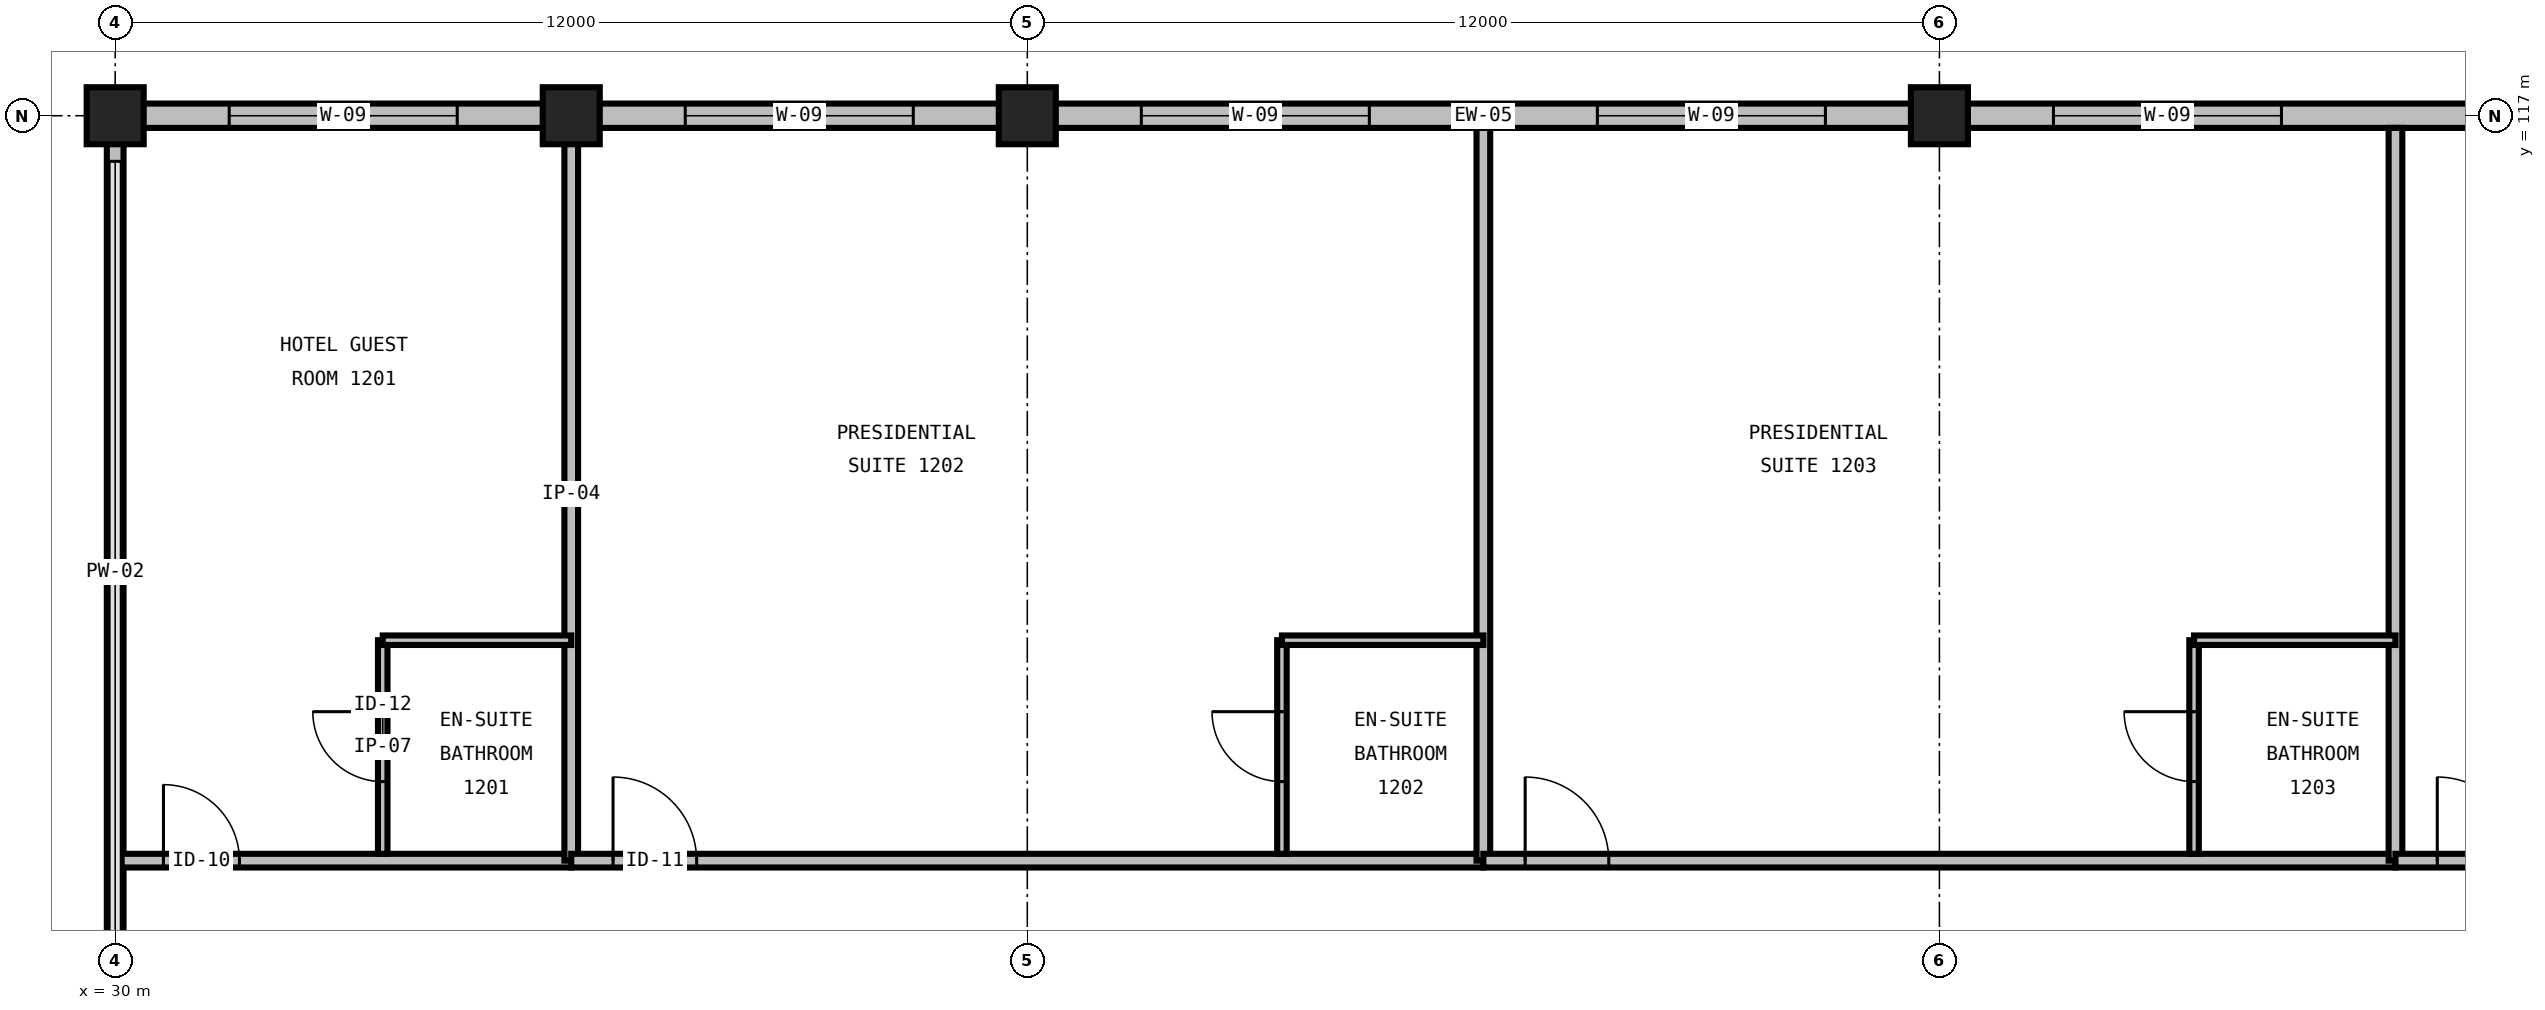
"""IFC4 building model, lengths in metres.
Left out: names, types, materials, properties, quantities, classifications, styles, units other than length and angle.
Written with IfcOpenShell. Run it as: python <this file> out.ifc"""

import sys

from ifc_helpers import new_model, si_unit, direction, frame, frame_2d, origin, origin_2d, place, context, subcontext, project, spatial, rectangle, extrude, element, fill, save


model = new_model("IFC4")
c1 = context("Model", 3, precision=1e-05, world=origin(), true_north=direction((0.0, 1.0)))
c2 = subcontext(c1, "Body", "Model", "MODEL_VIEW")
j1 = project(units=[si_unit("LENGTHUNIT", "METRE"), si_unit("PLANEANGLEUNIT", "RADIAN")], contexts=[c1])
p1 = place(None, origin())
s1 = spatial("IfcSite", under=j1, at=p1, CompositionType="ELEMENT")
p2 = place(p1, origin())
s2 = spatial("IfcBuilding", under=s1, at=p2, CompositionType="ELEMENT")
p3 = place(p2, frame((0.0, 0.0, 52.8)))
s3 = spatial("IfcBuildingStorey", under=s2, at=p3, CompositionType="ELEMENT", Elevation=52.8)
for number, where, z_axis, x_axis in (
    (1, (30.0, 117.0, 0.0), (0.0, 0.0, 1.0), (1.0, 0.0, 0.0)),
    (2, (36.0, 117.0, 0.0), (0.0, 0.0, 1.0), (1.0, 0.0, 0.0)),
    (3, (42.0, 117.0, 0.0), (0.0, 0.0, 1.0), (1.0, 0.0, 0.0)),
    (4, (54.0, 117.0, 0.0), (0.0, 0.0, 1.0), (1.0, 0.0, 0.0)),
):
    element("IfcColumn", number, at=place(p3, frame(where, z_axis=z_axis, x_axis=x_axis)), inside=s3, PredefinedType="COLUMN", context=c2, shape_type="SweptSolid", body=[
        extrude(rectangle(XDim=0.75, YDim=0.75, at=origin_2d()), origin(), (0.0, 0.0, 1.0), 3.6),
    ])
p4 = place(p3, frame((36.0, 117.0, 0.0), z_axis=(0.0, 0.0, 1.0), x_axis=(-1.0, 0.0, 0.0)))
e5 = element("IfcWall", 5, at=p4, inside=s3, PredefinedType="STANDARD", context=c2, shape_type="SweptSolid", body=[
    extrude(rectangle(XDim=6.0, YDim=0.32, at=frame_2d((3.0, 0.0))), origin(), (0.0, 0.0, 1.0), 2.536),
])
p5 = place(p4, frame((1.5, 0.0, 0.7)))
e6 = element("IfcOpeningElement", 6, at=p5, cuts=e5, PredefinedType="OPENING", context=c2, shape_type="SweptSolid", body=[
    extrude(rectangle(XDim=3.0, YDim=1.71, at=frame_2d((1.5, 0.855))), frame((0.0, 0.175, 0.0), z_axis=(0.0, -1.0, 0.0), x_axis=(1.0, 0.0, 0.0)), (0.0, 0.0, 1.0), 0.35),
])
p6 = place(p3, frame((42.0, 117.0, 0.0), z_axis=(0.0, 0.0, 1.0), x_axis=(-1.0, 0.0, 0.0)))
e7 = element("IfcWall", 7, at=p6, inside=s3, PredefinedType="STANDARD", context=c2, shape_type="SweptSolid", body=[
    extrude(rectangle(XDim=6.0, YDim=0.32, at=frame_2d((3.0, 0.0))), origin(), (0.0, 0.0, 1.0), 2.536),
])
p7 = place(p6, frame((1.5, 0.0, 0.7)))
e8 = element("IfcOpeningElement", 8, at=p7, cuts=e7, PredefinedType="OPENING", context=c2, shape_type="SweptSolid", body=[
    extrude(rectangle(XDim=3.0, YDim=1.71, at=frame_2d((1.5, 0.855))), frame((0.0, 0.175, 0.0), z_axis=(0.0, -1.0, 0.0), x_axis=(1.0, 0.0, 0.0)), (0.0, 0.0, 1.0), 0.35),
])
p8 = place(p3, frame((54.0, 117.0, 0.0), z_axis=(0.0, 0.0, 1.0), x_axis=(-1.0, 0.0, 0.0)))
e9 = element("IfcWall", 9, at=p8, inside=s3, PredefinedType="STANDARD", context=c2, shape_type="SweptSolid", body=[
    extrude(rectangle(XDim=12.0, YDim=0.32, at=frame_2d((6.0, 0.0))), origin(), (0.0, 0.0, 1.0), 2.536),
])
p9 = place(p8, frame((1.5, 0.0, 0.7)))
e10 = element("IfcOpeningElement", 10, at=p9, cuts=e9, PredefinedType="OPENING", context=c2, shape_type="SweptSolid", body=[
    extrude(rectangle(XDim=3.0, YDim=1.71, at=frame_2d((1.5, 0.855))), frame((0.0, 0.175, 0.0), z_axis=(0.0, -1.0, 0.0), x_axis=(1.0, 0.0, 0.0)), (0.0, 0.0, 1.0), 0.35),
])
p10 = place(p8, frame((7.5, 0.0, 0.7)))
e11 = element("IfcOpeningElement", 11, at=p10, cuts=e9, PredefinedType="OPENING", context=c2, shape_type="SweptSolid", body=[
    extrude(rectangle(XDim=3.0, YDim=1.71, at=frame_2d((1.5, 0.855))), frame((0.0, 0.175, 0.0), z_axis=(0.0, -1.0, 0.0), x_axis=(1.0, 0.0, 0.0)), (0.0, 0.0, 1.0), 0.35),
])
p11 = place(p3, frame((66.0, 117.0, 0.0), z_axis=(0.0, 0.0, 1.0), x_axis=(-1.0, 0.0, 0.0)))
e12 = element("IfcWall", 12, at=p11, inside=s3, PredefinedType="STANDARD", context=c2, shape_type="SweptSolid", body=[
    extrude(rectangle(XDim=12.0, YDim=0.32, at=frame_2d((6.0, 0.0))), origin(), (0.0, 0.0, 1.0), 2.536),
])
p12 = place(p11, frame((1.5, 0.0, 0.7)))
e13 = element("IfcOpeningElement", 13, at=p12, cuts=e12, PredefinedType="OPENING", context=c2, shape_type="SweptSolid", body=[
    extrude(rectangle(XDim=3.0, YDim=1.71, at=frame_2d((1.5, 0.855))), frame((0.0, 0.175, 0.0), z_axis=(0.0, -1.0, 0.0), x_axis=(1.0, 0.0, 0.0)), (0.0, 0.0, 1.0), 0.35),
])
p13 = place(p11, frame((7.5, 0.0, 0.7)))
e14 = element("IfcOpeningElement", 14, at=p13, cuts=e12, PredefinedType="OPENING", context=c2, shape_type="SweptSolid", body=[
    extrude(rectangle(XDim=3.0, YDim=1.71, at=frame_2d((1.5, 0.855))), frame((0.0, 0.175, 0.0), z_axis=(0.0, -1.0, 0.0), x_axis=(1.0, 0.0, 0.0)), (0.0, 0.0, 1.0), 0.35),
])
p14 = place(p3, frame((30.0, 117.0, 0.0), z_axis=(0.0, 0.0, 1.0), x_axis=(0.0, -1.0, 0.0)))
e15 = element("IfcWall", 15, at=p14, inside=s3, PredefinedType="PARAPET", context=c2, shape_type="SweptSolid", body=[
    extrude(rectangle(XDim=12.0, YDim=0.22, at=frame_2d((6.0, 0.0))), origin(), (0.0, 0.0, 1.0), 0.2),
])
p15 = place(p3, frame((30.085, 107.2, 0.0), z_axis=(0.0, 0.0, 1.0), x_axis=(1.0, 0.0, 0.0)))
e16 = element("IfcWall", 16, at=p15, inside=s3, PredefinedType="PARTITIONING", context=c2, shape_type="SweptSolid", body=[
    extrude(rectangle(XDim=5.915, YDim=0.18, at=frame_2d((2.957, 0.0))), origin(), (0.0, 0.0, 1.0), 3.29),
])
p16 = place(p15, frame((0.55, 0.0, 0.0)))
e17 = element("IfcOpeningElement", 17, at=p16, cuts=e16, PredefinedType="OPENING", context=c2, shape_type="SweptSolid", body=[
    extrude(rectangle(XDim=1.0, YDim=2.15, at=frame_2d((0.5, 1.075))), frame((0.0, 0.105, 0.0), z_axis=(0.0, -1.0, 0.0), x_axis=(1.0, 0.0, 0.0)), (0.0, 0.0, 1.0), 0.21),
])
p17 = place(p3, frame((36.0, 107.2, 0.0), z_axis=(0.0, 0.0, 1.0), x_axis=(0.0, 1.0, 0.0)))
e18 = element("IfcWall", 18, at=p17, inside=s3, PredefinedType="PARTITIONING", context=c2, shape_type="SweptSolid", body=[
    extrude(rectangle(XDim=9.64, YDim=0.18, at=frame_2d((4.82, 0.0))), origin(), (0.0, 0.0, 1.0), 2.59),
])
p18 = place(p3, frame((33.52, 107.29, 0.0), z_axis=(0.0, 0.0, 1.0), x_axis=(0.0, 1.0, 0.0)))
e19 = element("IfcWall", 19, at=p18, inside=s3, PredefinedType="PARTITIONING", context=c2, shape_type="SweptSolid", body=[
    extrude(rectangle(XDim=2.81, YDim=0.125, at=frame_2d((1.405, 0.0))), origin(), (0.0, 0.0, 1.0), 3.29),
])
p19 = place(p18, frame((0.95, 0.0, 0.0)))
e20 = element("IfcOpeningElement", 20, at=p19, cuts=e19, PredefinedType="OPENING", context=c2, shape_type="SweptSolid", body=[
    extrude(rectangle(XDim=0.92, YDim=2.1, at=frame_2d((0.46, 1.05))), frame((0.0, 0.077, 0.0), z_axis=(0.0, -1.0, 0.0), x_axis=(1.0, 0.0, 0.0)), (0.0, 0.0, 1.0), 0.155),
])
p20 = place(p3, frame((33.52, 110.1, 0.0), z_axis=(0.0, 0.0, 1.0), x_axis=(1.0, 0.0, 0.0)))
e21 = element("IfcWall", 21, at=p20, inside=s3, PredefinedType="PARTITIONING", context=c2, shape_type="SweptSolid", body=[
    extrude(rectangle(XDim=2.48, YDim=0.125, at=frame_2d((1.24, 0.0))), origin(), (0.0, 0.0, 1.0), 3.29),
])
p21 = place(p3, frame((36.0, 107.2, 0.0), z_axis=(0.0, 0.0, 1.0), x_axis=(1.0, 0.0, 0.0)))
e22 = element("IfcWall", 22, at=p21, inside=s3, PredefinedType="PARTITIONING", context=c2, shape_type="SweptSolid", body=[
    extrude(rectangle(XDim=12.0, YDim=0.18, at=frame_2d((6.0, 0.0))), origin(), (0.0, 0.0, 1.0), 3.29),
])
p22 = place(p21, frame((0.55, 0.0, 0.0)))
e23 = element("IfcOpeningElement", 23, at=p22, cuts=e22, PredefinedType="OPENING", context=c2, shape_type="SweptSolid", body=[
    extrude(rectangle(XDim=1.1, YDim=2.2, at=frame_2d((0.55, 1.1))), frame((0.0, 0.105, 0.0), z_axis=(0.0, -1.0, 0.0), x_axis=(1.0, 0.0, 0.0)), (0.0, 0.0, 1.0), 0.21),
])
p23 = place(p3, frame((48.0, 107.2, 0.0), z_axis=(0.0, 0.0, 1.0), x_axis=(0.0, 1.0, 0.0)))
e24 = element("IfcWall", 24, at=p23, inside=s3, PredefinedType="PARTITIONING", context=c2, shape_type="SweptSolid", body=[
    extrude(rectangle(XDim=9.64, YDim=0.18, at=frame_2d((4.82, 0.0))), origin(), (0.0, 0.0, 1.0), 3.29),
])
p24 = place(p3, frame((45.35, 107.29, 0.0), z_axis=(0.0, 0.0, 1.0), x_axis=(0.0, 1.0, 0.0)))
e25 = element("IfcWall", 25, at=p24, inside=s3, PredefinedType="PARTITIONING", context=c2, shape_type="SweptSolid", body=[
    extrude(rectangle(XDim=2.81, YDim=0.125, at=frame_2d((1.405, 0.0))), origin(), (0.0, 0.0, 1.0), 3.29),
])
p25 = place(p24, frame((0.95, 0.0, 0.0)))
e26 = element("IfcOpeningElement", 26, at=p25, cuts=e25, PredefinedType="OPENING", context=c2, shape_type="SweptSolid", body=[
    extrude(rectangle(XDim=0.92, YDim=2.1, at=frame_2d((0.46, 1.05))), frame((0.0, 0.077, 0.0), z_axis=(0.0, -1.0, 0.0), x_axis=(1.0, 0.0, 0.0)), (0.0, 0.0, 1.0), 0.155),
])
p26 = place(p3, frame((45.35, 110.1, 0.0), z_axis=(0.0, 0.0, 1.0), x_axis=(1.0, 0.0, 0.0)))
e27 = element("IfcWall", 27, at=p26, inside=s3, PredefinedType="PARTITIONING", context=c2, shape_type="SweptSolid", body=[
    extrude(rectangle(XDim=2.65, YDim=0.125, at=frame_2d((1.325, 0.0))), origin(), (0.0, 0.0, 1.0), 3.29),
])
p27 = place(p3, frame((48.0, 107.2, 0.0), z_axis=(0.0, 0.0, 1.0), x_axis=(1.0, 0.0, 0.0)))
e28 = element("IfcWall", 28, at=p27, inside=s3, PredefinedType="PARTITIONING", context=c2, shape_type="SweptSolid", body=[
    extrude(rectangle(XDim=12.0, YDim=0.18, at=frame_2d((6.0, 0.0))), origin(), (0.0, 0.0, 1.0), 3.29),
])
p28 = place(p27, frame((0.55, 0.0, 0.0)))
e29 = element("IfcOpeningElement", 29, at=p28, cuts=e28, PredefinedType="OPENING", context=c2, shape_type="SweptSolid", body=[
    extrude(rectangle(XDim=1.1, YDim=2.2, at=frame_2d((0.55, 1.1))), frame((0.0, 0.105, 0.0), z_axis=(0.0, -1.0, 0.0), x_axis=(1.0, 0.0, 0.0)), (0.0, 0.0, 1.0), 0.21),
])
p29 = place(p3, frame((60.0, 107.2, 0.0), z_axis=(0.0, 0.0, 1.0), x_axis=(0.0, 1.0, 0.0)))
e30 = element("IfcWall", 30, at=p29, inside=s3, PredefinedType="PARTITIONING", context=c2, shape_type="SweptSolid", body=[
    extrude(rectangle(XDim=9.64, YDim=0.18, at=frame_2d((4.82, 0.0))), origin(), (0.0, 0.0, 1.0), 3.29),
])
p30 = place(p3, frame((57.35, 107.29, 0.0), z_axis=(0.0, 0.0, 1.0), x_axis=(0.0, 1.0, 0.0)))
e31 = element("IfcWall", 31, at=p30, inside=s3, PredefinedType="PARTITIONING", context=c2, shape_type="SweptSolid", body=[
    extrude(rectangle(XDim=2.81, YDim=0.125, at=frame_2d((1.405, 0.0))), origin(), (0.0, 0.0, 1.0), 3.29),
])
p31 = place(p30, frame((0.95, 0.0, 0.0)))
e32 = element("IfcOpeningElement", 32, at=p31, cuts=e31, PredefinedType="OPENING", context=c2, shape_type="SweptSolid", body=[
    extrude(rectangle(XDim=0.92, YDim=2.1, at=frame_2d((0.46, 1.05))), frame((0.0, 0.077, 0.0), z_axis=(0.0, -1.0, 0.0), x_axis=(1.0, 0.0, 0.0)), (0.0, 0.0, 1.0), 0.155),
])
p32 = place(p3, frame((57.35, 110.1, 0.0), z_axis=(0.0, 0.0, 1.0), x_axis=(1.0, 0.0, 0.0)))
e33 = element("IfcWall", 33, at=p32, inside=s3, PredefinedType="PARTITIONING", context=c2, shape_type="SweptSolid", body=[
    extrude(rectangle(XDim=2.65, YDim=0.125, at=frame_2d((1.325, 0.0))), origin(), (0.0, 0.0, 1.0), 3.29),
])
p33 = place(p3, frame((60.0, 107.2, 0.0), z_axis=(0.0, 0.0, 1.0), x_axis=(1.0, 0.0, 0.0)))
e34 = element("IfcWall", 34, at=p33, inside=s3, PredefinedType="PARTITIONING", context=c2, shape_type="SweptSolid", body=[
    extrude(rectangle(XDim=12.0, YDim=0.18, at=frame_2d((6.0, 0.0))), origin(), (0.0, 0.0, 1.0), 3.29),
])
p34 = place(p33, frame((0.55, 0.0, 0.0)))
e35 = element("IfcOpeningElement", 35, at=p34, cuts=e34, PredefinedType="OPENING", context=c2, shape_type="SweptSolid", body=[
    extrude(rectangle(XDim=1.1, YDim=2.2, at=frame_2d((0.55, 1.1))), frame((0.0, 0.105, 0.0), z_axis=(0.0, -1.0, 0.0), x_axis=(1.0, 0.0, 0.0)), (0.0, 0.0, 1.0), 0.21),
])
p35 = place(p5, origin())
e36 = element("IfcWindow", 36, at=p35, inside=s3, PartitioningType="TRIPLE_PANEL_VERTICAL", PredefinedType="WINDOW", context=c2, shape_type="SweptSolid", body=[
    extrude(rectangle(XDim=3.0, YDim=1.71, at=frame_2d((1.5, 0.855))), frame((0.0, 0.03, 0.0), z_axis=(0.0, -1.0, 0.0), x_axis=(1.0, 0.0, 0.0)), (0.0, 0.0, 1.0), 0.06),
])
fill(e6, e36)
p36 = place(p7, origin())
e37 = element("IfcWindow", 37, at=p36, inside=s3, PartitioningType="TRIPLE_PANEL_VERTICAL", PredefinedType="WINDOW", context=c2, shape_type="SweptSolid", body=[
    extrude(rectangle(XDim=3.0, YDim=1.71, at=frame_2d((1.5, 0.855))), frame((0.0, 0.03, 0.0), z_axis=(0.0, -1.0, 0.0), x_axis=(1.0, 0.0, 0.0)), (0.0, 0.0, 1.0), 0.06),
])
fill(e8, e37)
p37 = place(p9, origin())
e38 = element("IfcWindow", 38, at=p37, inside=s3, PartitioningType="TRIPLE_PANEL_VERTICAL", PredefinedType="WINDOW", context=c2, shape_type="SweptSolid", body=[
    extrude(rectangle(XDim=3.0, YDim=1.71, at=frame_2d((1.5, 0.855))), frame((0.0, 0.03, 0.0), z_axis=(0.0, -1.0, 0.0), x_axis=(1.0, 0.0, 0.0)), (0.0, 0.0, 1.0), 0.06),
])
fill(e10, e38)
p38 = place(p10, origin())
e39 = element("IfcWindow", 39, at=p38, inside=s3, PartitioningType="TRIPLE_PANEL_VERTICAL", PredefinedType="WINDOW", context=c2, shape_type="SweptSolid", body=[
    extrude(rectangle(XDim=3.0, YDim=1.71, at=frame_2d((1.5, 0.855))), frame((0.0, 0.03, 0.0), z_axis=(0.0, -1.0, 0.0), x_axis=(1.0, 0.0, 0.0)), (0.0, 0.0, 1.0), 0.06),
])
fill(e11, e39)
p39 = place(p13, origin())
e40 = element("IfcWindow", 40, at=p39, inside=s3, PartitioningType="TRIPLE_PANEL_VERTICAL", PredefinedType="WINDOW", context=c2, shape_type="SweptSolid", body=[
    extrude(rectangle(XDim=3.0, YDim=1.71, at=frame_2d((1.5, 0.855))), frame((0.0, 0.03, 0.0), z_axis=(0.0, -1.0, 0.0), x_axis=(1.0, 0.0, 0.0)), (0.0, 0.0, 1.0), 0.06),
])
fill(e14, e40)
p40 = place(p16, origin())
e41 = element("IfcDoor", 41, at=p40, inside=s3, OperationType="SINGLE_SWING_LEFT", PredefinedType="DOOR", context=c2, shape_type="SweptSolid", body=[
    extrude(rectangle(XDim=1.0, YDim=2.15, at=frame_2d((0.5, 1.075))), frame((0.0, 0.025, 0.0), z_axis=(0.0, -1.0, 0.0), x_axis=(1.0, 0.0, 0.0)), (0.0, 0.0, 1.0), 0.05),
])
fill(e17, e41)
p41 = place(p19, origin())
e42 = element("IfcDoor", 42, at=p41, inside=s3, OperationType="SINGLE_SWING_RIGHT", PredefinedType="DOOR", context=c2, shape_type="SweptSolid", body=[
    extrude(rectangle(XDim=0.92, YDim=2.1, at=frame_2d((0.46, 1.05))), frame((0.0, 0.025, 0.0), z_axis=(0.0, -1.0, 0.0), x_axis=(1.0, 0.0, 0.0)), (0.0, 0.0, 1.0), 0.05),
])
fill(e20, e42)
p42 = place(p22, origin())
e43 = element("IfcDoor", 43, at=p42, inside=s3, OperationType="SINGLE_SWING_LEFT", PredefinedType="DOOR", context=c2, shape_type="SweptSolid", body=[
    extrude(rectangle(XDim=1.1, YDim=2.2, at=frame_2d((0.55, 1.1))), frame((0.0, 0.025, 0.0), z_axis=(0.0, -1.0, 0.0), x_axis=(1.0, 0.0, 0.0)), (0.0, 0.0, 1.0), 0.05),
])
fill(e23, e43)
p43 = place(p25, origin())
e44 = element("IfcDoor", 44, at=p43, inside=s3, OperationType="SINGLE_SWING_RIGHT", PredefinedType="DOOR", context=c2, shape_type="SweptSolid", body=[
    extrude(rectangle(XDim=0.92, YDim=2.1, at=frame_2d((0.46, 1.05))), frame((0.0, 0.025, 0.0), z_axis=(0.0, -1.0, 0.0), x_axis=(1.0, 0.0, 0.0)), (0.0, 0.0, 1.0), 0.05),
])
fill(e26, e44)
p44 = place(p28, origin())
e45 = element("IfcDoor", 45, at=p44, inside=s3, OperationType="SINGLE_SWING_LEFT", PredefinedType="DOOR", context=c2, shape_type="SweptSolid", body=[
    extrude(rectangle(XDim=1.1, YDim=2.2, at=frame_2d((0.55, 1.1))), frame((0.0, 0.025, 0.0), z_axis=(0.0, -1.0, 0.0), x_axis=(1.0, 0.0, 0.0)), (0.0, 0.0, 1.0), 0.05),
])
fill(e29, e45)
p45 = place(p31, origin())
e46 = element("IfcDoor", 46, at=p45, inside=s3, OperationType="SINGLE_SWING_RIGHT", PredefinedType="DOOR", context=c2, shape_type="SweptSolid", body=[
    extrude(rectangle(XDim=0.92, YDim=2.1, at=frame_2d((0.46, 1.05))), frame((0.0, 0.025, 0.0), z_axis=(0.0, -1.0, 0.0), x_axis=(1.0, 0.0, 0.0)), (0.0, 0.0, 1.0), 0.05),
])
fill(e32, e46)
p46 = place(p34, origin())
e47 = element("IfcDoor", 47, at=p46, inside=s3, OperationType="SINGLE_SWING_LEFT", PredefinedType="DOOR", context=c2, shape_type="SweptSolid", body=[
    extrude(rectangle(XDim=1.1, YDim=2.2, at=frame_2d((0.55, 1.1))), frame((0.0, 0.025, 0.0), z_axis=(0.0, -1.0, 0.0), x_axis=(1.0, 0.0, 0.0)), (0.0, 0.0, 1.0), 0.05),
])
fill(e35, e47)
save(model, sys.argv[1])
